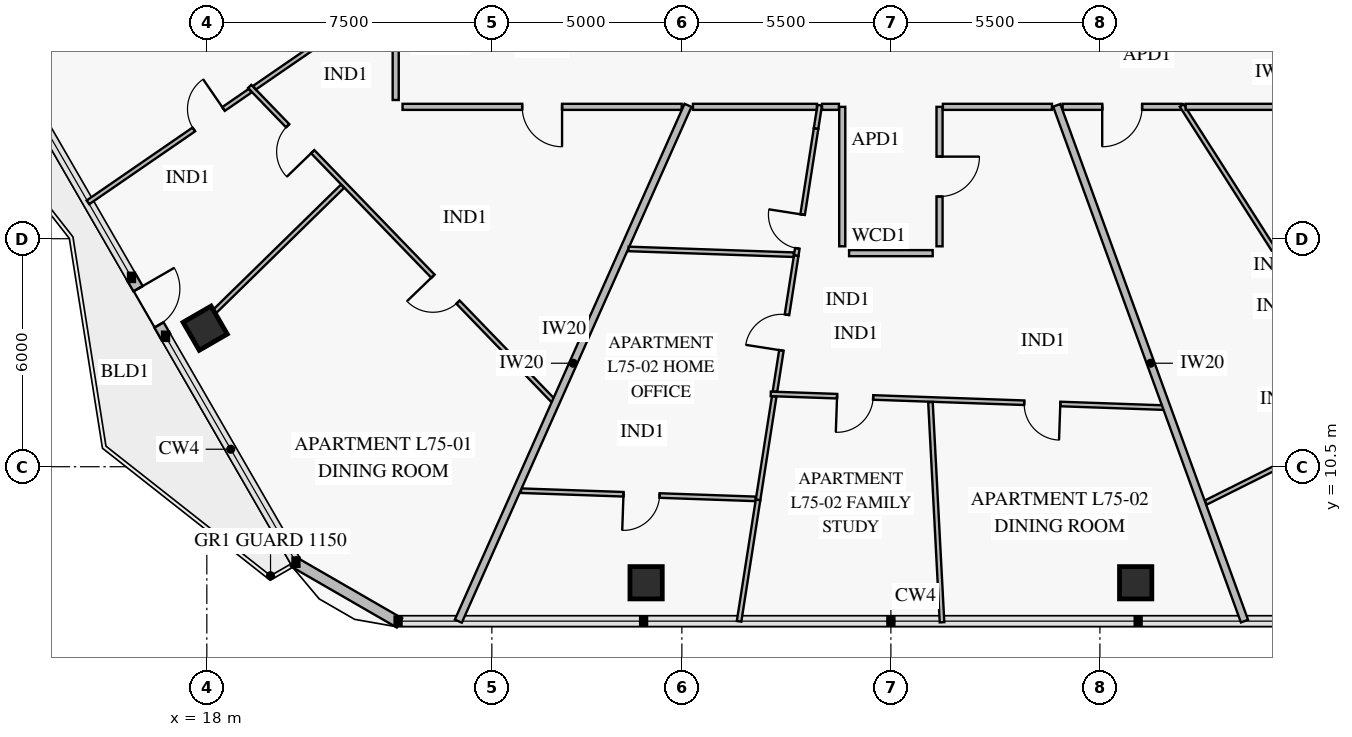
"""IFC4 building model, lengths in metres.
Left out: names, types, materials, properties, quantities, classifications, styles, units other than length and angle.
Written with IfcOpenShell. Run it as: python <this file> out.ifc"""

import sys

from ifc_helpers import new_model, si_unit, direction, frame, frame_2d, origin, origin_2d, place, context, subcontext, project, spatial, rectangle, extrude, element, fill, save


model = new_model("IFC4")
c1 = context("Model", 3, precision=1e-05, world=origin(), true_north=direction((0.0, 1.0)))
c2 = subcontext(c1, "Body", "Model", "MODEL_VIEW")
j1 = project(units=[si_unit("LENGTHUNIT", "METRE"), si_unit("PLANEANGLEUNIT", "RADIAN")], contexts=[c1])
p1 = place(None, origin())
s1 = spatial("IfcSite", under=j1, at=p1, CompositionType="ELEMENT")
p2 = place(p1, origin())
s2 = spatial("IfcBuilding", under=s1, at=p2, CompositionType="ELEMENT")
p3 = place(p2, frame((0.0, 0.0, 295.8)))
s3 = spatial("IfcBuildingStorey", under=s2, at=p3, CompositionType="ELEMENT", Elevation=295.8)
for number, where, z_axis, x_axis in (
    (1, (17.956, 14.145, 0.0), (0.0, 0.0, 1.0), (0.5, -0.866, 0.0)),
    (2, (29.559, 7.446, 0.0), (0.0, 0.0, 1.0), (1.0, 0.0, 0.0)),
    (3, (42.441, 7.446, 0.0), (0.0, 0.0, 1.0), (1.0, 0.0, 0.0)),
):
    element("IfcColumn", number, at=place(p3, frame(where, z_axis=z_axis, x_axis=x_axis)), inside=s3, PredefinedType="COLUMN", context=c2, shape_type="SweptSolid", body=[
        extrude(rectangle(XDim=0.85, YDim=0.85, at=origin_2d()), origin(), (0.0, 0.0, 1.0), 3.55),
    ])
p4 = place(p3, frame((23.07, 6.389, 0.0), z_axis=(0.0, 0.0, 1.0), x_axis=(-0.866028773314, 0.499994163758, 0.0)))
e4 = element("IfcWall", 4, at=p4, inside=s3, PredefinedType="SOLIDWALL", context=c2, shape_type="SweptSolid", body=[
    extrude(rectangle(XDim=3.215, YDim=0.28, at=frame_2d((1.607, 0.0))), origin(), (0.0, 0.0, 1.0), 3.55),
])
p5 = place(p3, frame((16.913, 13.932, 0.0), z_axis=(0.0, 0.0, 1.0), x_axis=(-0.499982180423, 0.866035691677, 0.0)))
e5 = element("IfcWall", 5, at=p5, inside=s3, PredefinedType="SOLIDWALL", context=c2, shape_type="SweptSolid", body=[
    extrude(rectangle(XDim=1.79, YDim=0.28, at=frame_2d((0.895, 0.0))), origin(), (0.0, 0.0, 1.0), 3.55),
])
p6 = place(p5, frame((0.345, 0.0, 0.0)))
e6 = element("IfcOpeningElement", 6, at=p6, cuts=e5, PredefinedType="OPENING", context=c2, shape_type="SweptSolid", body=[
    extrude(rectangle(XDim=1.1, YDim=2.2, at=frame_2d((0.55, 1.1))), frame((0.0, 0.152, 0.0), z_axis=(0.0, -1.0, 0.0), x_axis=(1.0, 0.0, 0.0)), (0.0, 0.0, 1.0), 0.304),
])
p7 = place(p3, frame((19.127, 20.508, 0.0), z_axis=(0.0, 0.0, 1.0), x_axis=(0.694661267459, -0.719337002727, 0.0)))
e7 = element("IfcWall", 7, at=p7, inside=s3, PredefinedType="PARTITIONING", context=c2, shape_type="SweptSolid", body=[
    extrude(rectangle(XDim=11.487, YDim=0.12, at=frame_2d((5.743, 0.0))), origin(), (0.0, 0.0, 1.0), 2.95),
])
p8 = place(p7, frame((1.438, 0.0, 0.0)))
e8 = element("IfcOpeningElement", 8, at=p8, cuts=e7, PredefinedType="OPENING", context=c2, shape_type="SweptSolid", body=[
    extrude(rectangle(XDim=0.95, YDim=2.1, at=frame_2d((0.475, 1.05))), frame((0.0, 0.072, 0.0), z_axis=(0.0, -1.0, 0.0), x_axis=(1.0, 0.0, 0.0)), (0.0, 0.0, 1.0), 0.144),
])
p9 = place(p7, frame((6.942, 0.0, 0.0)))
e9 = element("IfcOpeningElement", 9, at=p9, cuts=e7, PredefinedType="OPENING", context=c2, shape_type="SweptSolid", body=[
    extrude(rectangle(XDim=0.95, YDim=2.1, at=frame_2d((0.475, 1.05))), frame((0.0, 0.072, 0.0), z_axis=(0.0, -1.0, 0.0), x_axis=(1.0, 0.0, 0.0)), (0.0, 0.0, 1.0), 0.144),
])
p10 = place(p3, frame((21.186, 21.803, 0.0), z_axis=(0.0, 0.0, 1.0), x_axis=(-0.823756191061, -0.566944210384, 0.0)))
e10 = element("IfcWall", 10, at=p10, inside=s3, PredefinedType="PARTITIONING", context=c2, shape_type="SweptSolid", body=[
    extrude(rectangle(XDim=2.344, YDim=0.12, at=frame_2d((1.172, 0.0))), origin(), (0.0, 0.0, 1.0), 3.15),
])
p11 = place(p3, frame((19.141, 20.396, 0.0), z_axis=(0.0, 0.0, 1.0), x_axis=(-0.823725661839, -0.566988566047, 0.0)))
e11 = element("IfcWall", 11, at=p11, inside=s3, PredefinedType="PARTITIONING", context=c2, shape_type="SweptSolid", body=[
    extrude(rectangle(XDim=5.183, YDim=0.12, at=frame_2d((2.591, 0.0))), origin(), (0.0, 0.0, 1.0), 2.93),
])
p12 = place(p11, frame((0.85, 0.0, 0.0)))
e12 = element("IfcOpeningElement", 12, at=p12, cuts=e11, PredefinedType="OPENING", context=c2, shape_type="SweptSolid", body=[
    extrude(rectangle(XDim=0.95, YDim=2.1, at=frame_2d((0.475, 1.05))), frame((0.0, 0.072, 0.0), z_axis=(0.0, -1.0, 0.0), x_axis=(1.0, 0.0, 0.0)), (0.0, 0.0, 1.0), 0.144),
])
p13 = place(p3, frame((23.15, 19.97, 0.0), z_axis=(0.0, 0.0, 1.0), x_axis=(1.0, 0.0, 0.0)))
e13 = element("IfcWall", 13, at=p13, inside=s3, PredefinedType="PARTITIONING", context=c2, shape_type="SweptSolid", body=[
    extrude(rectangle(XDim=7.346, YDim=0.16, at=frame_2d((3.673, 0.0))), origin(), (0.0, 0.0, 1.0), 2.95),
])
p14 = place(p13, frame((3.148, 0.0, 0.0)))
e14 = element("IfcOpeningElement", 14, at=p14, cuts=e13, PredefinedType="OPENING", context=c2, shape_type="SweptSolid", body=[
    extrude(rectangle(XDim=1.05, YDim=2.15, at=frame_2d((0.525, 1.075))), frame((0.0, 0.092, 0.0), z_axis=(0.0, -1.0, 0.0), x_axis=(1.0, 0.0, 0.0)), (0.0, 0.0, 1.0), 0.184),
])
p15 = place(p3, frame((32.839, 12.417, 0.0), z_axis=(0.0, 0.0, 1.0), x_axis=(0.999390413178, -0.034911345561, 0.0)))
e15 = element("IfcWall", 15, at=p15, inside=s3, PredefinedType="PARTITIONING", context=c2, shape_type="SweptSolid", body=[
    extrude(rectangle(XDim=10.336, YDim=0.12, at=frame_2d((5.168, 0.0))), origin(), (0.0, 0.0, 1.0), 2.95),
])
p16 = place(p15, frame((1.746, 0.0, 0.0)))
e16 = element("IfcOpeningElement", 16, at=p16, cuts=e15, PredefinedType="OPENING", context=c2, shape_type="SweptSolid", body=[
    extrude(rectangle(XDim=0.95, YDim=2.1, at=frame_2d((0.475, 1.05))), frame((0.0, 0.072, 0.0), z_axis=(0.0, -1.0, 0.0), x_axis=(1.0, 0.0, 0.0)), (0.0, 0.0, 1.0), 0.144),
])
p17 = place(p15, frame((6.673, 0.0, 0.0)))
e17 = element("IfcOpeningElement", 17, at=p17, cuts=e15, PredefinedType="OPENING", context=c2, shape_type="SweptSolid", body=[
    extrude(rectangle(XDim=0.95, YDim=2.1, at=frame_2d((0.475, 1.05))), frame((0.0, 0.072, 0.0), z_axis=(0.0, -1.0, 0.0), x_axis=(1.0, 0.0, 0.0)), (0.0, 0.0, 1.0), 0.144),
])
p18 = place(p3, frame((34.031, 19.4, 0.0), z_axis=(0.0, 0.0, 1.0), x_axis=(-0.154412048647, -0.988006538052, 0.0)))
e18 = element("IfcWall", 18, at=p18, inside=s3, PredefinedType="PARTITIONING", context=c2, shape_type="SweptSolid", body=[
    extrude(rectangle(XDim=3.388, YDim=0.12, at=frame_2d((1.694, 0.0))), origin(), (0.0, 0.0, 1.0), 3.55),
])
p19 = place(p18, frame((2.293, 0.0, 0.0)))
e19 = element("IfcOpeningElement", 19, at=p19, cuts=e18, PredefinedType="OPENING", context=c2, shape_type="SweptSolid", body=[
    extrude(rectangle(XDim=0.9, YDim=2.1, at=frame_2d((0.45, 1.05))), frame((0.0, 0.072, 0.0), z_axis=(0.0, -1.0, 0.0), x_axis=(1.0, 0.0, 0.0)), (0.0, 0.0, 1.0), 0.144),
])
p20 = place(p3, frame((33.508, 16.052, 0.0), z_axis=(0.0, 0.0, 1.0), x_axis=(-0.154335671849, -0.988018471687, 0.0)))
e20 = element("IfcWall", 20, at=p20, inside=s3, PredefinedType="PARTITIONING", context=c2, shape_type="SweptSolid", body=[
    extrude(rectangle(XDim=3.615, YDim=0.12, at=frame_2d((1.807, 0.0))), origin(), (0.0, 0.0, 1.0), 3.15),
])
p21 = place(p20, frame((1.572, 0.0, 0.0)))
e21 = element("IfcOpeningElement", 21, at=p21, cuts=e20, PredefinedType="OPENING", context=c2, shape_type="SweptSolid", body=[
    extrude(rectangle(XDim=0.95, YDim=2.1, at=frame_2d((0.475, 1.05))), frame((0.0, 0.072, 0.0), z_axis=(0.0, -1.0, 0.0), x_axis=(1.0, 0.0, 0.0)), (0.0, 0.0, 1.0), 0.144),
])
p22 = place(p3, frame((32.929, 12.345, 0.0), z_axis=(0.0, 0.0, 1.0), x_axis=(-0.154349819993, -0.98801626154, 0.0)))
e22 = element("IfcWall", 22, at=p22, inside=s3, PredefinedType="PARTITIONING", context=c2, shape_type="SweptSolid", body=[
    extrude(rectangle(XDim=2.752, YDim=0.12, at=frame_2d((1.376, 0.0))), origin(), (0.0, 0.0, 1.0), 3.55),
])
p23 = place(p3, frame((26.268, 9.869, 0.0), z_axis=(0.0, 0.0, 1.0), x_axis=(0.9993904508, -0.034910268536, 0.0)))
e23 = element("IfcWall", 23, at=p23, inside=s3, PredefinedType="PARTITIONING", context=c2, shape_type="SweptSolid", body=[
    extrude(rectangle(XDim=6.175, YDim=0.12, at=frame_2d((3.087, 0.0))), origin(), (0.0, 0.0, 1.0), 2.95),
])
p24 = place(p23, frame((2.697, 0.0, 0.0)))
e24 = element("IfcOpeningElement", 24, at=p24, cuts=e23, PredefinedType="OPENING", context=c2, shape_type="SweptSolid", body=[
    extrude(rectangle(XDim=0.95, YDim=2.1, at=frame_2d((0.475, 1.05))), frame((0.0, 0.072, 0.0), z_axis=(0.0, -1.0, 0.0), x_axis=(1.0, 0.0, 0.0)), (0.0, 0.0, 1.0), 0.144),
])
p25 = place(p3, frame((37.28, 16.3, 0.0), z_axis=(0.0, 0.0, 1.0), x_axis=(0.0, 1.0, 0.0)))
e25 = element("IfcWall", 25, at=p25, inside=s3, PredefinedType="PARTITIONING", context=c2, shape_type="SweptSolid", body=[
    extrude(rectangle(XDim=3.67, YDim=0.16, at=frame_2d((1.835, 0.0))), origin(), (0.0, 0.0, 1.0), 3.55),
])
p26 = place(p25, frame((1.31, 0.0, 0.0)))
e26 = element("IfcOpeningElement", 26, at=p26, cuts=e25, PredefinedType="OPENING", context=c2, shape_type="SweptSolid", body=[
    extrude(rectangle(XDim=1.05, YDim=2.15, at=frame_2d((0.525, 1.075))), frame((0.0, 0.092, 0.0), z_axis=(0.0, -1.0, 0.0), x_axis=(1.0, 0.0, 0.0)), (0.0, 0.0, 1.0), 0.184),
])
p27 = place(p3, frame((44.284, 9.557, 0.0), z_axis=(0.0, 0.0, 1.0), x_axis=(0.894782574854, 0.446502120642, 0.0)))
e27 = element("IfcWall", 27, at=p27, inside=s3, PredefinedType="PARTITIONING", context=c2, shape_type="SweptSolid", body=[
    extrude(rectangle(XDim=5.217, YDim=0.12, at=frame_2d((2.608, 0.0))), origin(), (0.0, 0.0, 1.0), 3.55),
])
p28 = place(p27, frame((2.133, 0.0, 0.0)))
e28 = element("IfcOpeningElement", 28, at=p28, cuts=e27, PredefinedType="OPENING", context=c2, shape_type="SweptSolid", body=[
    extrude(rectangle(XDim=0.95, YDim=2.1, at=frame_2d((0.475, 1.05))), frame((0.0, 0.072, 0.0), z_axis=(0.0, -1.0, 0.0), x_axis=(1.0, 0.0, 0.0)), (0.0, 0.0, 1.0), 0.144),
])
p29 = place(p3, frame((40.519, 19.97, 0.0), z_axis=(0.0, 0.0, 1.0), x_axis=(1.0, 0.0, 0.0)))
e29 = element("IfcWall", 29, at=p29, inside=s3, PredefinedType="PARTITIONING", context=c2, shape_type="SweptSolid", body=[
    extrude(rectangle(XDim=3.133, YDim=0.16, at=frame_2d((1.566, 0.0))), origin(), (0.0, 0.0, 1.0), 3.55),
])
p30 = place(p29, frame((1.042, 0.0, 0.0)))
e30 = element("IfcOpeningElement", 30, at=p30, cuts=e29, PredefinedType="OPENING", context=c2, shape_type="SweptSolid", body=[
    extrude(rectangle(XDim=1.05, YDim=2.15, at=frame_2d((0.525, 1.075))), frame((0.0, 0.092, 0.0), z_axis=(0.0, -1.0, 0.0), x_axis=(1.0, 0.0, 0.0)), (0.0, 0.0, 1.0), 0.184),
])
p31 = place(p3, frame((21.571, 17.88, 0.0), z_axis=(0.0, 0.0, 1.0), x_axis=(-0.714721208256, -0.699409461238, 0.0)))
e31 = element("IfcWall", 31, at=p31, inside=s3, PredefinedType="PARTITIONING", context=c2, shape_type="SweptSolid", body=[
    extrude(rectangle(XDim=4.704, YDim=0.12, at=frame_2d((2.352, 0.0))), origin(), (0.0, 0.0, 1.0), 2.95),
])
p32 = place(p3, frame((30.662, 20.01, 0.0), z_axis=(0.0, 0.0, 1.0), x_axis=(-0.406725337387, -0.913550491176, 0.0)))
e32 = element("IfcWall", 32, at=p32, inside=s3, PredefinedType="PARTITIONING", context=c2, shape_type="SweptSolid", body=[
    extrude(rectangle(XDim=14.858, YDim=0.2, at=frame_2d((7.429, 0.0))), origin(), (0.0, 0.0, 1.0), 2.93),
])
p33 = place(p3, frame((37.041, 12.202, 0.0), z_axis=(0.0, 0.0, 1.0), x_axis=(0.05250142471, -0.998620849173, 0.0)))
e33 = element("IfcWall", 33, at=p33, inside=s3, PredefinedType="PARTITIONING", context=c2, shape_type="SweptSolid", body=[
    extrude(rectangle(XDim=5.803, YDim=0.12, at=frame_2d((2.902, 0.0))), origin(), (0.0, 0.0, 1.0), 2.93),
])
p34 = place(p3, frame((34.127, 20.015, 0.0), z_axis=(0.0, 0.0, 1.0), x_axis=(-0.154209298689, -0.988038203815, 0.0)))
e34 = element("IfcWall", 34, at=p34, inside=s3, PredefinedType="PARTITIONING", context=c2, shape_type="SweptSolid", body=[
    extrude(rectangle(XDim=0.622, YDim=0.12, at=frame_2d((0.311, 0.0))), origin(), (0.0, 0.0, 1.0), 3.55),
])
p35 = place(p3, frame((32.504, 9.626, 0.0), z_axis=(0.0, 0.0, 1.0), x_axis=(-0.15439991205, -0.988008434761, 0.0)))
e35 = element("IfcWall", 35, at=p35, inside=s3, PredefinedType="PARTITIONING", context=c2, shape_type="SweptSolid", body=[
    extrude(rectangle(XDim=3.234, YDim=0.12, at=frame_2d((1.617, 0.0))), origin(), (0.0, 0.0, 1.0), 2.93),
])
p36 = place(p3, frame((29.098, 16.231, 0.0), z_axis=(0.0, 0.0, 1.0), x_axis=(0.999392117738, -0.034862515735, 0.0)))
e36 = element("IfcWall", 36, at=p36, inside=s3, PredefinedType="PARTITIONING", context=c2, shape_type="SweptSolid", body=[
    extrude(rectangle(XDim=4.349, YDim=0.12, at=frame_2d((2.174, 0.0))), origin(), (0.0, 0.0, 1.0), 2.95),
])
p37 = place(p3, frame((40.364, 20.01, 0.0), z_axis=(0.0, 0.0, 1.0), x_axis=(0.342019888345, -0.939692713591, 0.0)))
e37 = element("IfcWall", 37, at=p37, inside=s3, PredefinedType="PARTITIONING", context=c2, shape_type="SweptSolid", body=[
    extrude(rectangle(XDim=14.445, YDim=0.2, at=frame_2d((7.222, 0.0))), origin(), (0.0, 0.0, 1.0), 2.93),
])
p38 = place(p3, frame((43.652, 20.007, 0.0), z_axis=(0.0, 0.0, 1.0), x_axis=(0.537879291551, -0.843021866692, 0.0)))
e38 = element("IfcWall", 38, at=p38, inside=s3, PredefinedType="PARTITIONING", context=c2, shape_type="SweptSolid", body=[
    extrude(rectangle(XDim=4.845, YDim=0.12, at=frame_2d((2.423, 0.0))), origin(), (0.0, 0.0, 1.0), 3.55),
])
p39 = place(p3, frame((22.97, 22.949, 0.0), z_axis=(0.0, 0.0, 1.0), x_axis=(0.0, -1.0, 0.0)))
e39 = element("IfcWall", 39, at=p39, inside=s3, PredefinedType="PARTITIONING", context=c2, shape_type="SweptSolid", body=[
    extrude(rectangle(XDim=2.799, YDim=0.16, at=frame_2d((1.399, 0.0))), origin(), (0.0, 0.0, 1.0), 3.55),
])
p40 = place(p3, frame((34.72, 19.97, 0.0), z_axis=(0.0, 0.0, 1.0), x_axis=(0.0, -1.0, 0.0)))
e40 = element("IfcWall", 40, at=p40, inside=s3, PredefinedType="PARTITIONING", context=c2, shape_type="SweptSolid", body=[
    extrude(rectangle(XDim=3.67, YDim=0.16, at=frame_2d((1.835, 0.0))), origin(), (0.0, 0.0, 1.0), 3.55),
])
p41 = place(p3, frame((37.368, 19.97, 0.0), z_axis=(0.0, 0.0, 1.0), x_axis=(1.0, 0.0, 0.0)))
e41 = element("IfcWall", 41, at=p41, inside=s3, PredefinedType="PARTITIONING", context=c2, shape_type="SweptSolid", body=[
    extrude(rectangle(XDim=2.871, YDim=0.16, at=frame_2d((1.436, 0.0))), origin(), (0.0, 0.0, 1.0), 2.95),
])
p42 = place(p3, frame((34.9, 16.12, 0.0), z_axis=(0.0, 0.0, 1.0), x_axis=(1.0, 0.0, 0.0)))
e42 = element("IfcWall", 42, at=p42, inside=s3, PredefinedType="PARTITIONING", context=c2, shape_type="SweptSolid", body=[
    extrude(rectangle(XDim=2.2, YDim=0.16, at=frame_2d((1.1, 0.0))), origin(), (0.0, 0.0, 1.0), 3.55),
])
p43 = place(p3, frame((34.189, 19.97, 0.0), z_axis=(0.0, 0.0, 1.0), x_axis=(1.0, 0.0, 0.0)))
e43 = element("IfcWall", 43, at=p43, inside=s3, PredefinedType="PARTITIONING", context=c2, shape_type="SweptSolid", body=[
    extrude(rectangle(XDim=0.443, YDim=0.16, at=frame_2d((0.221, 0.0))), origin(), (0.0, 0.0, 1.0), 3.55),
])
p44 = place(p3, frame((30.791, 19.97, 0.0), z_axis=(0.0, 0.0, 1.0), x_axis=(1.0, 0.0, 0.0)))
e44 = element("IfcWall", 44, at=p44, inside=s3, PredefinedType="PARTITIONING", context=c2, shape_type="SweptSolid", body=[
    extrude(rectangle(XDim=3.26, YDim=0.16, at=frame_2d((1.63, 0.0))), origin(), (0.0, 0.0, 1.0), 2.95),
])
p45 = place(p3, frame((43.757, 19.97, 0.0), z_axis=(0.0, 0.0, 1.0), x_axis=(1.0, 0.0, 0.0)))
e45 = element("IfcWall", 45, at=p45, inside=s3, PredefinedType="PARTITIONING", context=c2, shape_type="SweptSolid", body=[
    extrude(rectangle(XDim=4.809, YDim=0.16, at=frame_2d((2.405, 0.0))), origin(), (0.0, 0.0, 1.0), 2.95),
])
p46 = place(p6, frame((1.1, 0.0, 0.0), z_axis=(0.0, 0.0, 1.0), x_axis=(-1.0, 0.0, 0.0)))
e46 = element("IfcDoor", 46, at=p46, inside=s3, OperationType="SINGLE_SWING_LEFT", PredefinedType="DOOR", context=c2, shape_type="SweptSolid", body=[
    extrude(rectangle(XDim=1.1, YDim=2.2, at=frame_2d((0.55, 1.1))), frame((0.0, 0.025, 0.0), z_axis=(0.0, -1.0, 0.0), x_axis=(1.0, 0.0, 0.0)), (0.0, 0.0, 1.0), 0.05),
])
fill(e6, e46)
p47 = place(p8, frame((0.95, 0.0, 0.0), z_axis=(0.0, 0.0, 1.0), x_axis=(-1.0, 0.0, 0.0)))
e47 = element("IfcDoor", 47, at=p47, inside=s3, OperationType="SINGLE_SWING_LEFT", PredefinedType="DOOR", context=c2, shape_type="SweptSolid", body=[
    extrude(rectangle(XDim=0.95, YDim=2.1, at=frame_2d((0.475, 1.05))), frame((0.0, 0.025, 0.0), z_axis=(0.0, -1.0, 0.0), x_axis=(1.0, 0.0, 0.0)), (0.0, 0.0, 1.0), 0.05),
])
fill(e8, e47)
p48 = place(p9, frame((0.95, 0.0, 0.0), z_axis=(0.0, 0.0, 1.0), x_axis=(-1.0, 0.0, 0.0)))
e48 = element("IfcDoor", 48, at=p48, inside=s3, OperationType="SINGLE_SWING_RIGHT", PredefinedType="DOOR", context=c2, shape_type="SweptSolid", body=[
    extrude(rectangle(XDim=0.95, YDim=2.1, at=frame_2d((0.475, 1.05))), frame((0.0, 0.025, 0.0), z_axis=(0.0, -1.0, 0.0), x_axis=(1.0, 0.0, 0.0)), (0.0, 0.0, 1.0), 0.05),
])
fill(e9, e48)
p49 = place(p12, frame((0.95, 0.0, 0.0), z_axis=(0.0, 0.0, 1.0), x_axis=(-1.0, 0.0, 0.0)))
e49 = element("IfcDoor", 49, at=p49, inside=s3, OperationType="SINGLE_SWING_RIGHT", PredefinedType="DOOR", context=c2, shape_type="SweptSolid", body=[
    extrude(rectangle(XDim=0.95, YDim=2.1, at=frame_2d((0.475, 1.05))), frame((0.0, 0.025, 0.0), z_axis=(0.0, -1.0, 0.0), x_axis=(1.0, 0.0, 0.0)), (0.0, 0.0, 1.0), 0.05),
])
fill(e12, e49)
p50 = place(p14, frame((1.05, 0.0, 0.0), z_axis=(0.0, 0.0, 1.0), x_axis=(-1.0, 0.0, 0.0)))
e50 = element("IfcDoor", 50, at=p50, inside=s3, OperationType="SINGLE_SWING_LEFT", PredefinedType="DOOR", context=c2, shape_type="SweptSolid", body=[
    extrude(rectangle(XDim=1.05, YDim=2.15, at=frame_2d((0.525, 1.075))), frame((0.0, 0.025, 0.0), z_axis=(0.0, -1.0, 0.0), x_axis=(1.0, 0.0, 0.0)), (0.0, 0.0, 1.0), 0.05),
])
fill(e14, e50)
p51 = place(p16, frame((0.95, 0.0, 0.0), z_axis=(0.0, 0.0, 1.0), x_axis=(-1.0, 0.0, 0.0)))
e51 = element("IfcDoor", 51, at=p51, inside=s3, OperationType="SINGLE_SWING_RIGHT", PredefinedType="DOOR", context=c2, shape_type="SweptSolid", body=[
    extrude(rectangle(XDim=0.95, YDim=2.1, at=frame_2d((0.475, 1.05))), frame((0.0, 0.025, 0.0), z_axis=(0.0, -1.0, 0.0), x_axis=(1.0, 0.0, 0.0)), (0.0, 0.0, 1.0), 0.05),
])
fill(e16, e51)
p52 = place(p17, frame((0.95, 0.0, 0.0), z_axis=(0.0, 0.0, 1.0), x_axis=(-1.0, 0.0, 0.0)))
e52 = element("IfcDoor", 52, at=p52, inside=s3, OperationType="SINGLE_SWING_LEFT", PredefinedType="DOOR", context=c2, shape_type="SweptSolid", body=[
    extrude(rectangle(XDim=0.95, YDim=2.1, at=frame_2d((0.475, 1.05))), frame((0.0, 0.025, 0.0), z_axis=(0.0, -1.0, 0.0), x_axis=(1.0, 0.0, 0.0)), (0.0, 0.0, 1.0), 0.05),
])
fill(e17, e52)
p53 = place(p19, frame((0.9, 0.0, 0.0), z_axis=(0.0, 0.0, 1.0), x_axis=(-1.0, 0.0, 0.0)))
e53 = element("IfcDoor", 53, at=p53, inside=s3, OperationType="SINGLE_SWING_RIGHT", PredefinedType="DOOR", context=c2, shape_type="SweptSolid", body=[
    extrude(rectangle(XDim=0.9, YDim=2.1, at=frame_2d((0.45, 1.05))), frame((0.0, 0.025, 0.0), z_axis=(0.0, -1.0, 0.0), x_axis=(1.0, 0.0, 0.0)), (0.0, 0.0, 1.0), 0.05),
])
fill(e19, e53)
p54 = place(p21, frame((0.95, 0.0, 0.0), z_axis=(0.0, 0.0, 1.0), x_axis=(-1.0, 0.0, 0.0)))
e54 = element("IfcDoor", 54, at=p54, inside=s3, OperationType="SINGLE_SWING_LEFT", PredefinedType="DOOR", context=c2, shape_type="SweptSolid", body=[
    extrude(rectangle(XDim=0.95, YDim=2.1, at=frame_2d((0.475, 1.05))), frame((0.0, 0.025, 0.0), z_axis=(0.0, -1.0, 0.0), x_axis=(1.0, 0.0, 0.0)), (0.0, 0.0, 1.0), 0.05),
])
fill(e21, e54)
p55 = place(p24, frame((0.95, 0.0, 0.0), z_axis=(0.0, 0.0, 1.0), x_axis=(-1.0, 0.0, 0.0)))
e55 = element("IfcDoor", 55, at=p55, inside=s3, OperationType="SINGLE_SWING_RIGHT", PredefinedType="DOOR", context=c2, shape_type="SweptSolid", body=[
    extrude(rectangle(XDim=0.95, YDim=2.1, at=frame_2d((0.475, 1.05))), frame((0.0, 0.025, 0.0), z_axis=(0.0, -1.0, 0.0), x_axis=(1.0, 0.0, 0.0)), (0.0, 0.0, 1.0), 0.05),
])
fill(e24, e55)
p56 = place(p26, frame((1.05, 0.0, 0.0), z_axis=(0.0, 0.0, 1.0), x_axis=(-1.0, 0.0, 0.0)))
e56 = element("IfcDoor", 56, at=p56, inside=s3, OperationType="SINGLE_SWING_LEFT", PredefinedType="DOOR", context=c2, shape_type="SweptSolid", body=[
    extrude(rectangle(XDim=1.05, YDim=2.15, at=frame_2d((0.525, 1.075))), frame((0.0, 0.025, 0.0), z_axis=(0.0, -1.0, 0.0), x_axis=(1.0, 0.0, 0.0)), (0.0, 0.0, 1.0), 0.05),
])
fill(e26, e56)
p57 = place(p30, frame((1.05, 0.0, 0.0), z_axis=(0.0, 0.0, 1.0), x_axis=(-1.0, 0.0, 0.0)))
e57 = element("IfcDoor", 57, at=p57, inside=s3, OperationType="SINGLE_SWING_RIGHT", PredefinedType="DOOR", context=c2, shape_type="SweptSolid", body=[
    extrude(rectangle(XDim=1.05, YDim=2.15, at=frame_2d((0.525, 1.075))), frame((0.0, 0.025, 0.0), z_axis=(0.0, -1.0, 0.0), x_axis=(1.0, 0.0, 0.0)), (0.0, 0.0, 1.0), 0.05),
])
fill(e30, e57)
save(model, sys.argv[1])
